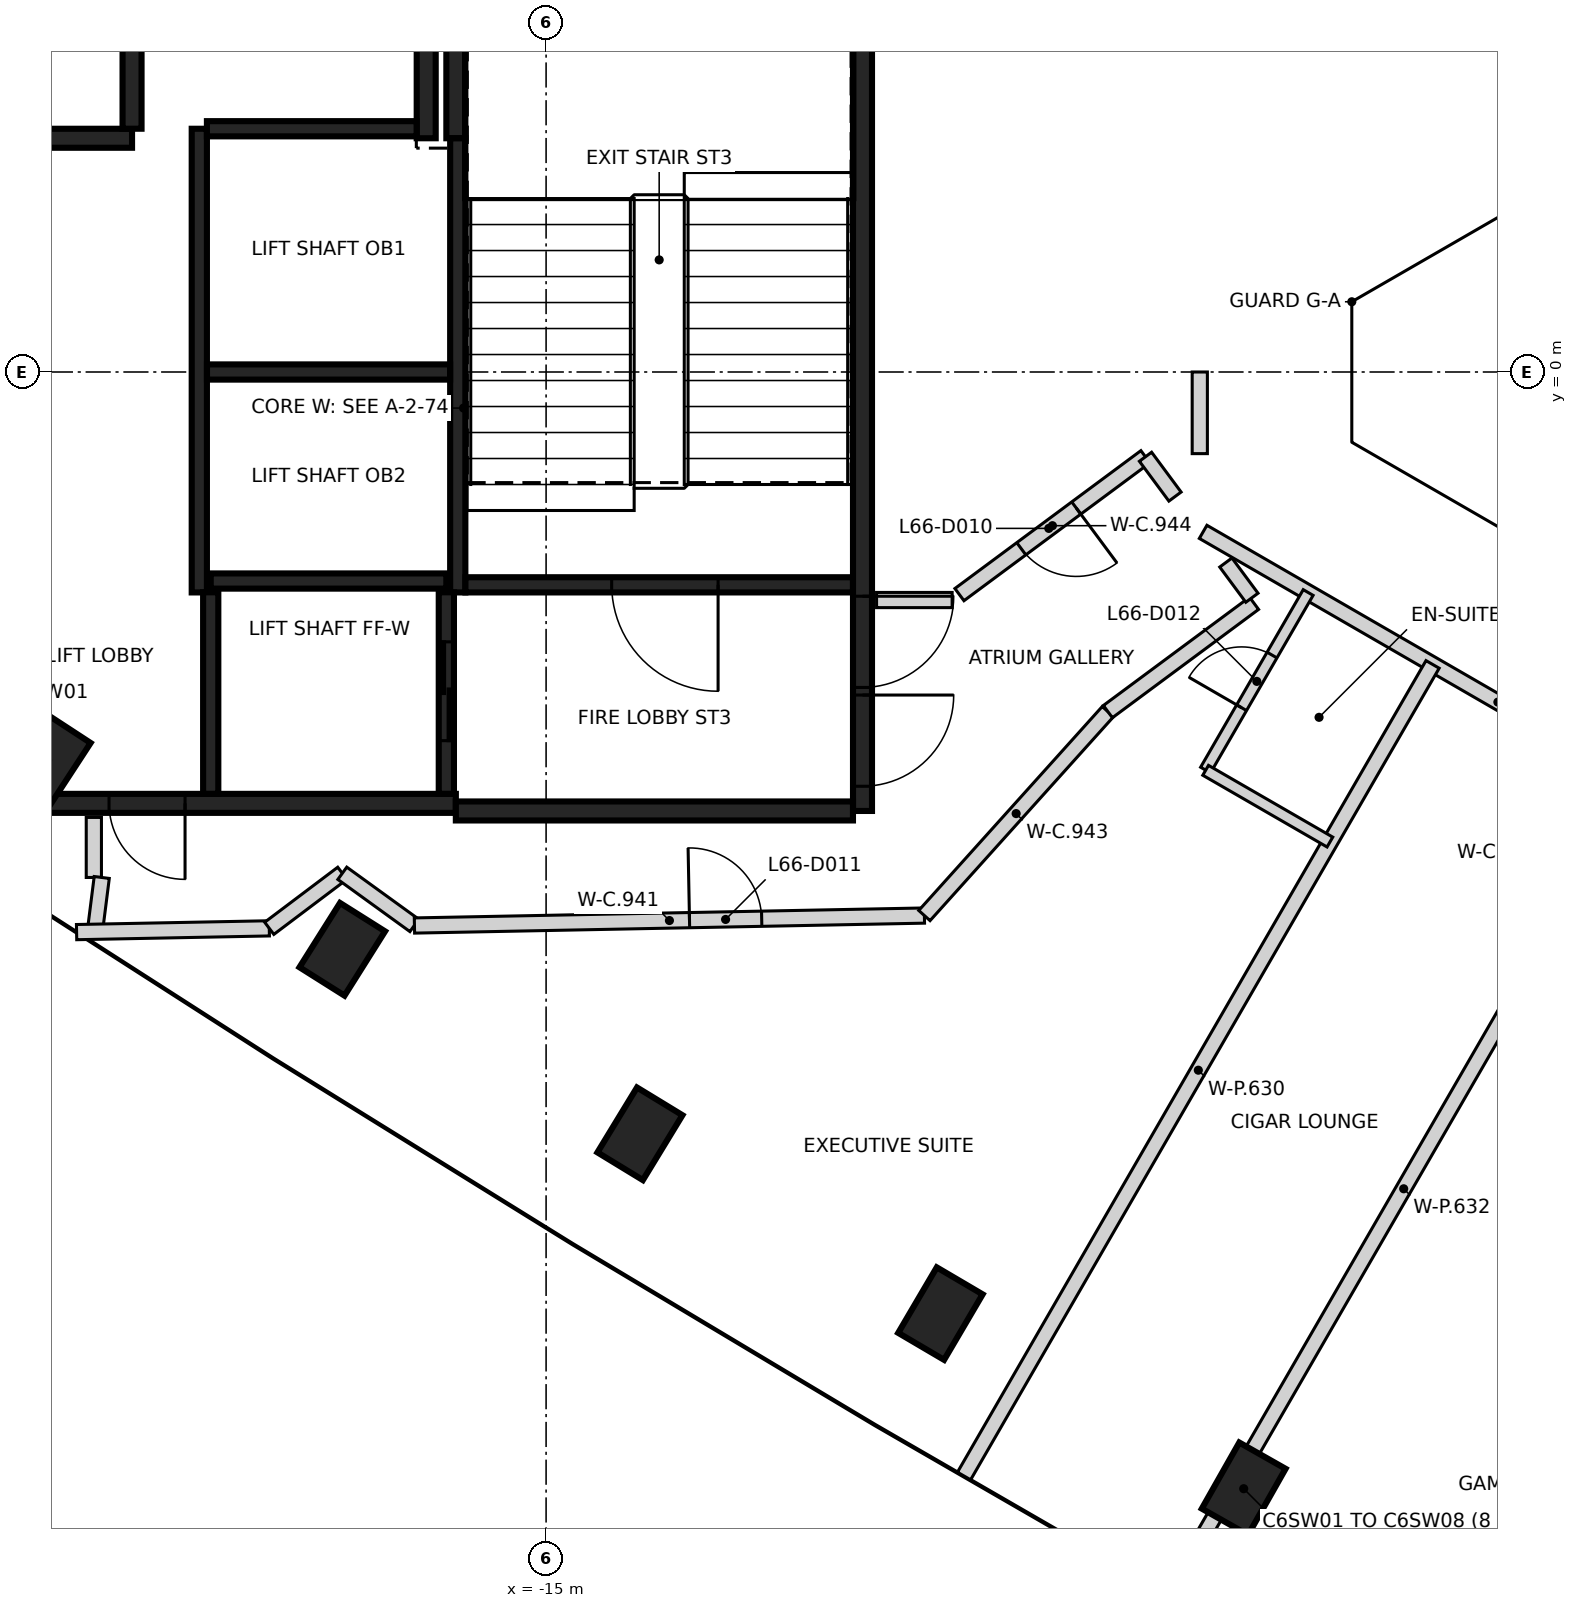
"""IFC4 building model, lengths in metres.
Left out: names, types, materials, properties, quantities, classifications, styles, units other than length and angle.
Written with IfcOpenShell. Run it as: python <this file> out.ifc"""

import sys

from ifc_helpers import new_model, si_unit, direction, frame, frame_2d, origin, origin_2d, place, context, subcontext, project, spatial, rectangle, extrude, element, fill, save


model = new_model("IFC4")
c1 = context("Model", 3, precision=1e-05, world=origin(), true_north=direction((0.0, 1.0)))
c2 = subcontext(c1, "Body", "Model", "MODEL_VIEW")
j1 = project(units=[si_unit("LENGTHUNIT", "METRE"), si_unit("PLANEANGLEUNIT", "RADIAN")], contexts=[c1])
p1 = place(None, origin())
s1 = spatial("IfcSite", under=j1, at=p1, CompositionType="ELEMENT")
p2 = place(p1, origin())
s2 = spatial("IfcBuilding", under=s1, at=p2, CompositionType="ELEMENT")
p3 = place(p2, frame((0.0, 0.0, 262.2)))
s3 = spatial("IfcBuildingStorey", under=s2, at=p3, CompositionType="ELEMENT", Elevation=262.2)
for number, where, z_axis, x_axis in (
    (1, (-21.559, -5.107, -0.35), (0.0, 0.0, 1.0), (0.547, 0.837, 0.0)),
    (2, (-17.681, -7.595, -0.35), (0.0, 0.0, 1.0), (0.533, 0.846, 0.0)),
    (3, (-13.765, -10.022, -0.35), (0.0, 0.0, 1.0), (0.52, 0.854, 0.0)),
    (4, (-9.812, -12.388, -0.35), (0.0, 0.0, 1.0), (0.507, 0.862, 0.0)),
    (5, (-5.822, -14.691, -0.35), (0.0, 0.0, 1.0), (0.493, 0.87, 0.0)),
):
    element("IfcColumn", number, at=place(p3, frame(where, z_axis=z_axis, x_axis=x_axis)), inside=s3, PredefinedType="COLUMN", context=c2, shape_type="SweptSolid", body=[
        extrude(rectangle(XDim=1.0, YDim=0.7, at=origin_2d()), origin(), (0.0, 0.0, 1.0), 3.6),
    ])
p4 = place(p3, frame((-10.837, 5.775, 0.0), z_axis=(0.0, 0.0, 1.0), x_axis=(0.0, -1.0, 0.0)))
e6 = element("IfcWall", 6, at=p4, inside=s3, PredefinedType="SHEAR", context=c2, shape_type="SweptSolid", body=[
    extrude(rectangle(XDim=11.55, YDim=0.25, at=frame_2d((5.775, 0.0))), origin(), (0.0, 0.0, 1.0), 3.25),
])
p5 = place(p4, frame((10.025, 0.0, 0.0)))
e7 = element("IfcOpeningElement", 7, at=p5, cuts=e6, PredefinedType="OPENING", context=c2, shape_type="SweptSolid", body=[
    extrude(rectangle(XDim=1.2, YDim=2.1, at=frame_2d((0.6, 1.05))), frame((0.0, 0.135, 0.0), z_axis=(0.0, -1.0, 0.0), x_axis=(1.0, 0.0, 0.0)), (0.0, 0.0, 1.0), 0.27),
])
p6 = place(p4, frame((8.725, 0.0, 0.0)))
e8 = element("IfcOpeningElement", 8, at=p6, cuts=e6, PredefinedType="OPENING", context=c2, shape_type="SweptSolid", body=[
    extrude(rectangle(XDim=1.2, YDim=2.1, at=frame_2d((0.6, 1.05))), frame((0.0, 0.135, 0.0), z_axis=(0.0, -1.0, 0.0), x_axis=(1.0, 0.0, 0.0)), (0.0, 0.0, 1.0), 0.27),
])
p7 = place(p3, frame((-16.187, -5.675, 0.0), z_axis=(0.0, 0.0, 1.0), x_axis=(-1.0, 0.0, 0.0)))
e9 = element("IfcWall", 9, at=p7, inside=s3, PredefinedType="SHEAR", context=c2, shape_type="SweptSolid", body=[
    extrude(rectangle(XDim=6.125, YDim=0.25, at=frame_2d((3.062, 0.0))), origin(), (0.0, 0.0, 1.0), 3.25),
])
p8 = place(p7, frame((3.563, 0.0, 0.0)))
e10 = element("IfcOpeningElement", 10, at=p8, cuts=e9, PredefinedType="OPENING", context=c2, shape_type="SweptSolid", body=[
    extrude(rectangle(XDim=1.0, YDim=2.1, at=frame_2d((0.5, 1.05))), frame((0.0, 0.135, 0.0), z_axis=(0.0, -1.0, 0.0), x_axis=(1.0, 0.0, 0.0)), (0.0, 0.0, 1.0), 0.27),
])
p9 = place(p3, frame((-10.963, -5.775, 0.0), z_axis=(0.0, 0.0, 1.0), x_axis=(-1.0, 0.0, 0.0)))
e11 = element("IfcWall", 11, at=p9, inside=s3, PredefinedType="SHEAR", context=c2, shape_type="SweptSolid", body=[
    extrude(rectangle(XDim=5.225, YDim=0.25, at=frame_2d((2.612, 0.0))), origin(), (0.0, 0.0, 1.0), 3.25),
])
p10 = place(p3, frame((-16.187, 3.075, 0.0), z_axis=(0.0, 0.0, 1.0), x_axis=(0.0, 1.0, 0.0)))
e12 = element("IfcWall", 12, at=p10, inside=s3, PredefinedType="SHEAR", context=c2, shape_type="SweptSolid", body=[
    extrude(rectangle(XDim=2.575, YDim=0.25, at=frame_2d((1.287, 0.0))), origin(), (0.0, 0.0, 1.0), 3.25),
])
p11 = place(p3, frame((-22.312, 3.075, 0.0), z_axis=(0.0, 0.0, 1.0), x_axis=(1.0, 0.0, 0.0)))
e13 = element("IfcWall", 13, at=p11, inside=s3, PredefinedType="SHEAR", context=c2, shape_type="SweptSolid", body=[
    extrude(rectangle(XDim=1.865, YDim=0.25, at=frame_2d((0.932, 0.0))), origin(), (0.0, 0.0, 1.0), 3.25),
])
p12 = place(p3, frame((-16.577, 4.785, 0.0), z_axis=(0.0, 0.0, 1.0), x_axis=(0.0, -1.0, 0.0)))
e14 = element("IfcWall", 14, at=p12, inside=s3, PredefinedType="SHEAR", context=c2, shape_type="SweptSolid", body=[
    extrude(rectangle(XDim=1.71, YDim=0.25, at=frame_2d((0.855, 0.0))), origin(), (0.0, 0.0, 1.0), 3.25),
])
p13 = place(p3, frame((-20.447, 3.2, 0.0), z_axis=(0.0, 0.0, 1.0), x_axis=(0.0, 1.0, 0.0)))
e15 = element("IfcWall", 15, at=p13, inside=s3, PredefinedType="SHEAR", context=c2, shape_type="SweptSolid", body=[
    extrude(rectangle(XDim=1.584, YDim=0.25, at=frame_2d((0.792, 0.0))), origin(), (0.0, 0.0, 1.0), 3.25),
])
p14 = place(p3, frame((-16.162, 3.074, 0.0), z_axis=(0.0, 0.0, 1.0), x_axis=(0.0, -1.0, 0.0)))
e16 = element("IfcWall", 16, at=p14, inside=s3, PredefinedType="SHEAR", context=c2, shape_type="SweptSolid", body=[
    extrude(rectangle(XDim=5.974, YDim=0.2, at=frame_2d((2.987, 0.0))), origin(), (0.0, 0.0, 1.0), 3.25),
])
p15 = place(p3, frame((-19.562, -2.9, 0.0), z_axis=(0.0, 0.0, 1.0), x_axis=(0.0, 1.0, 0.0)))
e17 = element("IfcWall", 17, at=p15, inside=s3, PredefinedType="SHEAR", context=c2, shape_type="SweptSolid", body=[
    extrude(rectangle(XDim=6.1, YDim=0.2, at=frame_2d((3.05, 0.0))), origin(), (0.0, 0.0, 1.0), 3.25),
])
p16 = place(p3, frame((-10.963, -2.8, 0.0), z_axis=(0.0, 0.0, 1.0), x_axis=(-1.0, 0.0, 0.0)))
e18 = element("IfcWall", 18, at=p16, inside=s3, PredefinedType="SHEAR", context=c2, shape_type="SweptSolid", body=[
    extrude(rectangle(XDim=5.098, YDim=0.2, at=frame_2d((2.549, 0.0))), origin(), (0.0, 0.0, 1.0), 3.25),
])
p17 = place(p16, frame((1.774, 0.0, 0.0)))
e19 = element("IfcOpeningElement", 19, at=p17, cuts=e18, PredefinedType="OPENING", context=c2, shape_type="SweptSolid", body=[
    extrude(rectangle(XDim=1.4, YDim=2.1, at=frame_2d((0.7, 1.05))), frame((0.0, 0.11, 0.0), z_axis=(0.0, -1.0, 0.0), x_axis=(1.0, 0.0, 0.0)), (0.0, 0.0, 1.0), 0.22),
])
p18 = place(p3, frame((-16.263, 0.0, 0.0), z_axis=(0.0, 0.0, 1.0), x_axis=(-1.0, 0.0, 0.0)))
e20 = element("IfcWall", 20, at=p18, inside=s3, PredefinedType="SHEAR", context=c2, shape_type="SweptSolid", body=[
    extrude(rectangle(XDim=3.198, YDim=0.2, at=frame_2d((1.599, 0.0))), origin(), (0.0, 0.0, 1.0), 3.25),
])
p19 = place(p3, frame((-19.462, 3.2, 0.0), z_axis=(0.0, 0.0, 1.0), x_axis=(1.0, 0.0, 0.0)))
e21 = element("IfcWall", 21, at=p19, inside=s3, PredefinedType="SHEAR", context=c2, shape_type="SweptSolid", body=[
    extrude(rectangle(XDim=2.759, YDim=0.2, at=frame_2d((1.379, 0.0))), origin(), (0.0, 0.0, 1.0), 3.25),
])
p20 = place(p3, frame((-19.412, -2.75, 0.0), z_axis=(0.0, 0.0, 1.0), x_axis=(1.0, 0.0, 0.0)))
e22 = element("IfcWall", 22, at=p20, inside=s3, PredefinedType="SHEAR", context=c2, shape_type="SweptSolid", body=[
    extrude(rectangle(XDim=3.1, YDim=0.2, at=frame_2d((1.55, 0.0))), origin(), (0.0, 0.0, 1.0), 3.25),
])
p21 = place(p3, frame((-16.312, -2.898, 0.0), z_axis=(0.0, 0.0, 1.0), x_axis=(0.0, -1.0, 0.0)))
e23 = element("IfcWall", 23, at=p21, inside=s3, PredefinedType="SHEAR", context=c2, shape_type="SweptSolid", body=[
    extrude(rectangle(XDim=2.651, YDim=0.2, at=frame_2d((1.325, 0.0))), origin(), (0.0, 0.0, 1.0), 3.25),
])
p22 = place(p21, frame((0.652, 0.0, 0.0)))
e24 = element("IfcOpeningElement", 24, at=p22, cuts=e23, PredefinedType="OPENING", context=c2, shape_type="SweptSolid", body=[
    extrude(rectangle(XDim=1.3, YDim=2.1, at=frame_2d((0.65, 1.05))), frame((0.0, 0.11, 0.0), z_axis=(0.0, -1.0, 0.0), x_axis=(1.0, 0.0, 0.0)), (0.0, 0.0, 1.0), 0.22),
])
p23 = place(p3, frame((-19.412, -5.549, 0.0), z_axis=(0.0, 0.0, 1.0), x_axis=(0.0, 1.0, 0.0)))
e25 = element("IfcWall", 25, at=p23, inside=s3, PredefinedType="SHEAR", context=c2, shape_type="SweptSolid", body=[
    extrude(rectangle(XDim=2.651, YDim=0.2, at=frame_2d((1.325, 0.0))), origin(), (0.0, 0.0, 1.0), 3.25),
])
p24 = place(p3, frame((-20.95, -6.65, 0.0), z_axis=(0.0, 0.0, 1.0), x_axis=(0.0, 1.0, 0.0)))
e26 = element("IfcWall", 26, at=p24, inside=s3, PredefinedType="PARTITIONING", context=c2, shape_type="SweptSolid", body=[
    extrude(rectangle(XDim=0.79, YDim=0.2, at=frame_2d((0.395, 0.0))), origin(), (0.0, 0.0, 1.0), 3.25),
])
p25 = place(p3, frame((-20.929, -7.306, 0.0), z_axis=(0.0, 0.0, 1.0), x_axis=(0.125534186853, 0.992089294334, 0.0)))
e27 = element("IfcWall", 27, at=p25, inside=s3, PredefinedType="PARTITIONING", context=c2, shape_type="SweptSolid", body=[
    extrude(rectangle(XDim=0.661, YDim=0.2, at=frame_2d((0.331, 0.0))), origin(), (0.0, 0.0, 1.0), 3.25),
])
p26 = place(p3, frame((-21.177, -7.369, 0.0), z_axis=(0.0, 0.0, 1.0), x_axis=(0.999808930271, 0.019547453804, 0.0)))
e28 = element("IfcWall", 28, at=p26, inside=s3, PredefinedType="PARTITIONING", context=c2, shape_type="SweptSolid", body=[
    extrude(rectangle(XDim=2.535, YDim=0.2, at=frame_2d((1.268, 0.0))), origin(), (0.0, 0.0, 1.0), 3.25),
])
p27 = place(p3, frame((-18.642, -7.319, 0.0), z_axis=(0.0, 0.0, 1.0), x_axis=(0.798707882989, 0.601718968998, 0.0)))
e29 = element("IfcWall", 29, at=p27, inside=s3, PredefinedType="PARTITIONING", context=c2, shape_type="SweptSolid", body=[
    extrude(rectangle(XDim=1.203, YDim=0.2, at=frame_2d((0.602, 0.0))), origin(), (0.0, 0.0, 1.0), 2.35),
])
p28 = place(p3, frame((-17.681, -6.595, 0.0), z_axis=(0.0, 0.0, 1.0), x_axis=(0.810123213102, -0.586259652026, 0.0)))
e30 = element("IfcWall", 30, at=p28, inside=s3, PredefinedType="PARTITIONING", context=c2, shape_type="SweptSolid", body=[
    extrude(rectangle(XDim=1.17, YDim=0.2, at=frame_2d((0.585, 0.0))), origin(), (0.0, 0.0, 1.0), 3.25),
])
p29 = place(p3, frame((-16.732, -7.282, 0.0), z_axis=(0.0, 0.0, 1.0), x_axis=(0.999809119854, 0.019537754635, 0.0)))
e31 = element("IfcWall", 31, at=p29, inside=s3, PredefinedType="PARTITIONING", context=c2, shape_type="SweptSolid", body=[
    extrude(rectangle(XDim=6.71, YDim=0.2, at=frame_2d((3.355, 0.0))), origin(), (0.0, 0.0, 1.0), 3.25),
])
p30 = place(p29, frame((3.619, 0.0, 0.0)))
e32 = element("IfcOpeningElement", 32, at=p30, cuts=e31, PredefinedType="OPENING", context=c2, shape_type="SweptSolid", body=[
    extrude(rectangle(XDim=0.95, YDim=2.1, at=frame_2d((0.475, 1.05))), frame((0.0, 0.11, 0.0), z_axis=(0.0, -1.0, 0.0), x_axis=(1.0, 0.0, 0.0)), (0.0, 0.0, 1.0), 0.22),
])
p31 = place(p3, frame((-10.652, -3.0, 0.0), z_axis=(0.0, 0.0, 1.0), x_axis=(1.0, 0.0, 0.0)))
e33 = element("IfcWall", 33, at=p31, inside=s3, PredefinedType="PARTITIONING", context=c2, shape_type="SweptSolid", body=[
    extrude(rectangle(XDim=0.994, YDim=0.2, at=frame_2d((0.497, 0.0))), origin(), (0.0, 0.0, 1.0), 3.25),
])
p32 = place(p3, frame((-10.023, -7.151, 0.0), z_axis=(0.0, 0.0, 1.0), x_axis=(0.668886243279, 0.743364778256, 0.0)))
e34 = element("IfcWall", 34, at=p32, inside=s3, PredefinedType="PARTITIONING", context=c2, shape_type="SweptSolid", body=[
    extrude(rectangle(XDim=3.609, YDim=0.2, at=frame_2d((1.805, 0.0))), origin(), (0.0, 0.0, 1.0), 3.25),
])
p33 = place(p3, frame((-7.115, -1.115, 0.0), z_axis=(0.0, 0.0, 1.0), x_axis=(-0.803344165632, -0.595515030495, 0.0)))
e35 = element("IfcWall", 35, at=p33, inside=s3, PredefinedType="PARTITIONING", context=c2, shape_type="SweptSolid", body=[
    extrude(rectangle(XDim=3.046, YDim=0.2, at=frame_2d((1.523, 0.0))), origin(), (0.0, 0.0, 1.0), 3.25),
])
p34 = place(p33, frame((1.133, 0.0, 0.0)))
e36 = element("IfcOpeningElement", 36, at=p34, cuts=e35, PredefinedType="OPENING", context=c2, shape_type="SweptSolid", body=[
    extrude(rectangle(XDim=0.9, YDim=2.1, at=frame_2d((0.45, 1.05))), frame((0.0, 0.11, 0.0), z_axis=(0.0, -1.0, 0.0), x_axis=(1.0, 0.0, 0.0)), (0.0, 0.0, 1.0), 0.22),
])
p35 = place(p3, frame((-7.609, -4.468, 0.0), z_axis=(0.0, 0.0, 1.0), x_axis=(0.803414413351, 0.595420255298, 0.0)))
e37 = element("IfcWall", 37, at=p35, inside=s3, PredefinedType="PARTITIONING", context=c2, shape_type="SweptSolid", body=[
    extrude(rectangle(XDim=2.393, YDim=0.2, at=frame_2d((1.197, 0.0))), origin(), (0.0, 0.0, 1.0), 3.25),
])
p36 = place(p3, frame((-7.114, -1.115, 0.0), z_axis=(0.0, 0.0, 1.0), x_axis=(0.595075286625, -0.803669959155, 0.0)))
e38 = element("IfcWall", 38, at=p36, inside=s3, PredefinedType="PARTITIONING", context=c2, shape_type="SweptSolid", body=[
    extrude(rectangle(XDim=0.652, YDim=0.2, at=frame_2d((0.326, 0.0))), origin(), (0.0, 0.0, 1.0), 3.25),
])
p37 = place(p3, frame((-6.4, -1.074, 0.0), z_axis=(0.0, 0.0, 1.0), x_axis=(0.0, 1.0, 0.0)))
e39 = element("IfcWall", 39, at=p37, inside=s3, PredefinedType="PARTITIONING", context=c2, shape_type="SweptSolid", body=[
    extrude(rectangle(XDim=1.074, YDim=0.2, at=frame_2d((0.537, 0.0))), origin(), (0.0, 0.0, 1.0), 3.25),
])
p38 = place(p3, frame((-6.057, -2.507, 0.0), z_axis=(0.0, 0.0, 1.0), x_axis=(0.594974339713, -0.803744695213, 0.0)))
e40 = element("IfcWall", 40, at=p38, inside=s3, PredefinedType="PARTITIONING", context=c2, shape_type="SweptSolid", body=[
    extrude(rectangle(XDim=0.576, YDim=0.2, at=frame_2d((0.288, 0.0))), origin(), (0.0, 0.0, 1.0), 3.25),
])
p39 = place(p3, frame((-6.356, -2.103, 0.0), z_axis=(0.0, 0.0, 1.0), x_axis=(0.865939059902, -0.50014952218, 0.0)))
e41 = element("IfcWall", 41, at=p39, inside=s3, PredefinedType="PARTITIONING", context=c2, shape_type="SweptSolid", body=[
    extrude(rectangle(XDim=8.956, YDim=0.2, at=frame_2d((4.478, 0.0))), origin(), (0.0, 0.0, 1.0), 3.25),
])
p40 = place(p39, frame((4.546, 0.0, 0.0)))
e42 = element("IfcOpeningElement", 42, at=p40, cuts=e41, PredefinedType="OPENING", context=c2, shape_type="SweptSolid", body=[
    extrude(rectangle(XDim=1.0, YDim=2.1, at=frame_2d((0.5, 1.05))), frame((0.0, 0.11, 0.0), z_axis=(0.0, -1.0, 0.0), x_axis=(1.0, 0.0, 0.0)), (0.0, 0.0, 1.0), 0.22),
])
p41 = place(p39, frame((7.275, 0.0, 0.0)))
e43 = element("IfcOpeningElement", 43, at=p41, cuts=e41, PredefinedType="OPENING", context=c2, shape_type="SweptSolid", body=[
    extrude(rectangle(XDim=1.0, YDim=2.1, at=frame_2d((0.5, 1.05))), frame((0.0, 0.11, 0.0), z_axis=(0.0, -1.0, 0.0), x_axis=(1.0, 0.0, 0.0)), (0.0, 0.0, 1.0), 0.22),
])
p42 = place(p3, frame((-9.501, -14.524, 0.0), z_axis=(0.0, 0.0, 1.0), x_axis=(0.499964147476, 0.86604610226, 0.0)))
e44 = element("IfcWall", 44, at=p42, inside=s3, PredefinedType="PARTITIONING", context=c2, shape_type="SweptSolid", body=[
    extrude(rectangle(XDim=12.329, YDim=0.2, at=frame_2d((6.165, 0.0))), origin(), (0.0, 0.0, 1.0), 2.35),
])
p43 = place(p3, frame((-6.8, -16.084, 0.0), z_axis=(0.0, 0.0, 1.0), x_axis=(0.500002425662, 0.866024003323, 0.0)))
e45 = element("IfcWall", 45, at=p43, inside=s3, PredefinedType="PARTITIONING", context=c2, shape_type="SweptSolid", body=[
    extrude(rectangle(XDim=12.329, YDim=0.2, at=frame_2d((6.165, 0.0))), origin(), (0.0, 0.0, 1.0), 3.25),
])
p44 = place(p3, frame((-6.324, -5.237, 0.0), z_axis=(0.0, 0.0, 1.0), x_axis=(0.500294180644, 0.865855491877, 0.0)))
e46 = element("IfcWall", 46, at=p44, inside=s3, PredefinedType="PARTITIONING", context=c2, shape_type="SweptSolid", body=[
    extrude(rectangle(XDim=2.698, YDim=0.15, at=frame_2d((1.349, 0.0))), origin(), (0.0, 0.0, 1.0), 3.25),
])
p45 = place(p44, frame((0.948, 0.0, 0.0)))
e47 = element("IfcOpeningElement", 47, at=p45, cuts=e46, PredefinedType="OPENING", context=c2, shape_type="SweptSolid", body=[
    extrude(rectangle(XDim=0.8, YDim=2.1, at=frame_2d((0.4, 1.05))), frame((0.0, 0.085, 0.0), z_axis=(0.0, -1.0, 0.0), x_axis=(1.0, 0.0, 0.0)), (0.0, 0.0, 1.0), 0.17),
])
p46 = place(p3, frame((-6.323, -5.24, 0.0), z_axis=(0.0, 0.0, 1.0), x_axis=(0.865998231832, -0.50004706025, 0.0)))
e48 = element("IfcWall", 48, at=p46, inside=s3, PredefinedType="PARTITIONING", context=c2, shape_type="SweptSolid", body=[
    extrude(rectangle(XDim=1.888, YDim=0.15, at=frame_2d((0.944, 0.0))), origin(), (0.0, 0.0, 1.0), 3.25),
])
p47 = place(p22, origin())
e49 = element("IfcDoor", 49, at=p47, inside=s3, OperationType="SLIDING_TO_LEFT", PredefinedType="DOOR", context=c2, shape_type="SweptSolid", body=[
    extrude(rectangle(XDim=1.3, YDim=2.1, at=frame_2d((0.65, 1.05))), frame((0.0, 0.025, 0.0), z_axis=(0.0, -1.0, 0.0), x_axis=(1.0, 0.0, 0.0)), (0.0, 0.0, 1.0), 0.05),
])
fill(e24, e49)
p48 = place(p8, origin())
e50 = element("IfcDoor", 50, at=p48, inside=s3, OperationType="SINGLE_SWING_LEFT", PredefinedType="DOOR", context=c2, shape_type="SweptSolid", body=[
    extrude(rectangle(XDim=1.0, YDim=2.1, at=frame_2d((0.5, 1.05))), frame((0.0, 0.025, 0.0), z_axis=(0.0, -1.0, 0.0), x_axis=(1.0, 0.0, 0.0)), (0.0, 0.0, 1.0), 0.05),
])
fill(e10, e50)
p49 = place(p5, origin())
e51 = element("IfcDoor", 51, at=p49, inside=s3, OperationType="SINGLE_SWING_LEFT", PredefinedType="DOOR", context=c2, shape_type="SweptSolid", body=[
    extrude(rectangle(XDim=1.2, YDim=2.1, at=frame_2d((0.6, 1.05))), frame((0.0, 0.025, 0.0), z_axis=(0.0, -1.0, 0.0), x_axis=(1.0, 0.0, 0.0)), (0.0, 0.0, 1.0), 0.05),
])
fill(e7, e51)
p50 = place(p6, origin())
e52 = element("IfcDoor", 52, at=p50, inside=s3, OperationType="SINGLE_SWING_RIGHT", PredefinedType="DOOR", context=c2, shape_type="SweptSolid", body=[
    extrude(rectangle(XDim=1.2, YDim=2.1, at=frame_2d((0.6, 1.05))), frame((0.0, 0.025, 0.0), z_axis=(0.0, -1.0, 0.0), x_axis=(1.0, 0.0, 0.0)), (0.0, 0.0, 1.0), 0.05),
])
fill(e8, e52)
p51 = place(p17, origin())
e53 = element("IfcDoor", 53, at=p51, inside=s3, OperationType="SINGLE_SWING_LEFT", PredefinedType="DOOR", context=c2, shape_type="SweptSolid", body=[
    extrude(rectangle(XDim=1.4, YDim=2.1, at=frame_2d((0.7, 1.05))), frame((0.0, 0.025, 0.0), z_axis=(0.0, -1.0, 0.0), x_axis=(1.0, 0.0, 0.0)), (0.0, 0.0, 1.0), 0.05),
])
fill(e19, e53)
p52 = place(p34, origin())
e54 = element("IfcDoor", 54, at=p52, inside=s3, OperationType="SINGLE_SWING_LEFT", PredefinedType="DOOR", context=c2, shape_type="SweptSolid", body=[
    extrude(rectangle(XDim=0.9, YDim=2.1, at=frame_2d((0.45, 1.05))), frame((0.0, 0.025, 0.0), z_axis=(0.0, -1.0, 0.0), x_axis=(1.0, 0.0, 0.0)), (0.0, 0.0, 1.0), 0.05),
])
fill(e36, e54)
p53 = place(p30, frame((0.95, 0.0, 0.0), z_axis=(0.0, 0.0, 1.0), x_axis=(-1.0, 0.0, 0.0)))
e55 = element("IfcDoor", 55, at=p53, inside=s3, OperationType="SINGLE_SWING_LEFT", PredefinedType="DOOR", context=c2, shape_type="SweptSolid", body=[
    extrude(rectangle(XDim=0.95, YDim=2.1, at=frame_2d((0.475, 1.05))), frame((0.0, 0.025, 0.0), z_axis=(0.0, -1.0, 0.0), x_axis=(1.0, 0.0, 0.0)), (0.0, 0.0, 1.0), 0.05),
])
fill(e32, e55)
p54 = place(p45, origin())
e56 = element("IfcDoor", 56, at=p54, inside=s3, OperationType="SINGLE_SWING_LEFT", PredefinedType="DOOR", context=c2, shape_type="SweptSolid", body=[
    extrude(rectangle(XDim=0.8, YDim=2.1, at=frame_2d((0.4, 1.05))), frame((0.0, 0.025, 0.0), z_axis=(0.0, -1.0, 0.0), x_axis=(1.0, 0.0, 0.0)), (0.0, 0.0, 1.0), 0.05),
])
fill(e47, e56)
save(model, sys.argv[1])
